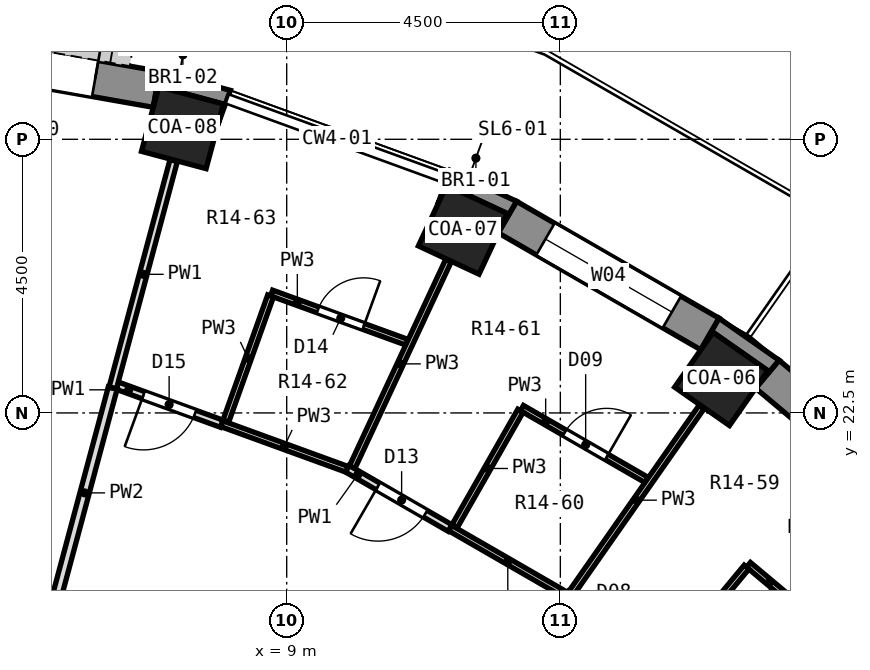
"""IFC4 building model, lengths in metres.
Left out: names, types, materials, properties, quantities, classifications, styles, units other than length and angle.
Written with IfcOpenShell. Run it as: python <this file> out.ifc"""

import sys

from ifc_helpers import new_model, si_unit, direction, frame, frame_2d, origin, origin_2d, place, context, subcontext, project, spatial, polyline, rectangle, outline, extrude, element, fill, save


model = new_model("IFC4")
c1 = context("Model", 3, precision=1e-05, world=origin(), true_north=direction((0.0, 1.0)))
c2 = subcontext(c1, "Body", "Model", "MODEL_VIEW")
j1 = project(units=[si_unit("LENGTHUNIT", "METRE"), si_unit("PLANEANGLEUNIT", "RADIAN")], contexts=[c1])
p1 = place(None, origin())
s1 = spatial("IfcSite", under=j1, at=p1, CompositionType="ELEMENT")
p2 = place(p1, origin())
s2 = spatial("IfcBuilding", under=s1, at=p2, CompositionType="ELEMENT")
p3 = place(p2, frame((0.0, 0.0, 75.8)))
s3 = spatial("IfcBuildingStorey", under=s2, at=p3, CompositionType="ELEMENT", Elevation=75.8)
for number, where, z_axis, x_axis in (
    (1, (16.146, 23.059, 0.0), (0.0, 0.0, 1.0), (0.574, 0.819, 0.0)),
    (2, (11.897, 25.512, 0.0), (0.0, 0.0, 1.0), (0.423, 0.906, 0.0)),
    (3, (7.286, 27.191, 0.0), (0.0, 0.0, 1.0), (0.259, 0.966, 0.0)),
):
    element("IfcColumn", number, at=place(p3, frame(where, z_axis=z_axis, x_axis=x_axis)), inside=s3, PredefinedType="COLUMN", context=c2, shape_type="SweptSolid", body=[
        extrude(rectangle(XDim=1.1, YDim=1.1, at=origin_2d()), origin(), (0.0, 0.0, 1.0), 3.3),
    ])
p4 = place(p3, frame((19.85, 20.665, 0.0), z_axis=(0.0, 0.0, 1.0), x_axis=(-0.766026164483, 0.642809392687, 0.0)))
e4 = element("IfcWall", 4, at=p4, inside=s3, PredefinedType="SOLIDWALL", context=c2, shape_type="SweptSolid", body=[
    extrude(rectangle(XDim=3.846, YDim=0.6, at=frame_2d((1.923, 0.0))), origin(), (0.0, 0.0, 1.0), 2.75),
])
p5 = place(p4, frame((0.723, 0.0, 0.9)))
e5 = element("IfcOpeningElement", 5, at=p5, cuts=e4, PredefinedType="OPENING", context=c2, shape_type="SweptSolid", body=[
    extrude(rectangle(XDim=2.4, YDim=1.8, at=frame_2d((1.2, 0.9))), frame((0.0, 0.312, 0.0), z_axis=(0.0, -1.0, 0.0), x_axis=(1.0, 0.0, 0.0)), (0.0, 0.0, 1.0), 0.624),
])
p6 = place(p3, frame((15.96, 23.798, 0.0), z_axis=(0.0, 0.0, 1.0), x_axis=(-0.86603124159, 0.499989888488, 0.0)))
e6 = element("IfcWall", 6, at=p6, inside=s3, PredefinedType="SOLIDWALL", context=c2, shape_type="SweptSolid", body=[
    extrude(rectangle(XDim=3.846, YDim=0.6, at=frame_2d((1.923, 0.0))), origin(), (0.0, 0.0, 1.0), 2.75),
])
p7 = place(p6, frame((0.723, 0.0, 0.9)))
e7 = element("IfcOpeningElement", 7, at=p7, cuts=e6, PredefinedType="OPENING", context=c2, shape_type="SweptSolid", body=[
    extrude(rectangle(XDim=2.4, YDim=1.8, at=frame_2d((1.2, 0.9))), frame((0.0, 0.312, 0.0), z_axis=(0.0, -1.0, 0.0), x_axis=(1.0, 0.0, 0.0)), (0.0, 0.0, 1.0), 0.624),
])
p8 = place(p3, frame((6.858, 27.821, 0.0), z_axis=(0.0, 0.0, 1.0), x_axis=(-0.984800809218, 0.173687553279, 0.0)))
e8 = element("IfcWall", 8, at=p8, inside=s3, PredefinedType="SOLIDWALL", context=c2, shape_type="SweptSolid", body=[
    extrude(rectangle(XDim=3.846, YDim=0.6, at=frame_2d((1.923, 0.0))), origin(), (0.0, 0.0, 1.0), 2.75),
])
p9 = place(p8, frame((1.023, 0.0, 0.0)))
e9 = element("IfcOpeningElement", 9, at=p9, cuts=e8, PredefinedType="OPENING", context=c2, shape_type="SweptSolid", body=[
    extrude(rectangle(XDim=1.8, YDim=2.4, at=frame_2d((0.9, 1.2))), frame((0.0, 0.312, 0.0), z_axis=(0.0, -1.0, 0.0), x_axis=(1.0, 0.0, 0.0)), (0.0, 0.0, 1.0), 0.624),
])
p10 = place(p3, origin())
e10 = element("IfcWall", 10, at=p10, inside=s3, PredefinedType="SOLIDWALL", context=c2, shape_type="SweptSolid", body=[
    extrude(outline(polyline([(17.097, 23.367), (16.11, 24.058), (15.81, 23.538), (16.011, 23.825), (16.912, 23.194), (16.711, 22.907), (17.097, 23.367)])), origin(), (0.0, 0.0, 1.0), 2.75),
])
p11 = place(p3, origin())
e11 = element("IfcWall", 11, at=p11, inside=s3, PredefinedType="SOLIDWALL", context=c2, shape_type="SweptSolid", body=[
    extrude(outline(polyline([(11.688, 26.49), (11.483, 25.926), (11.631, 26.243), (12.628, 25.779), (12.479, 25.461), (12.78, 25.981), (11.688, 26.49)])), origin(), (0.0, 0.0, 1.0), 2.75),
])
p12 = place(p3, origin())
e12 = element("IfcWall", 12, at=p12, inside=s3, PredefinedType="SOLIDWALL", context=c2, shape_type="SweptSolid", body=[
    extrude(outline(polyline([(6.91, 28.117), (6.806, 27.526), (6.897, 27.865), (7.959, 27.58), (7.869, 27.241), (8.074, 27.805), (6.91, 28.117)])), origin(), (0.0, 0.0, 1.0), 2.75),
])
p13 = place(p3, frame((16.594, 20.003, 0.0), z_axis=(0.0, 0.0, 1.0), x_axis=(0.766216087927, -0.642582995886, 0.0)))
e13 = element("IfcWall", 13, at=p13, inside=s3, PredefinedType="PARTITIONING", context=c2, shape_type="SweptSolid", body=[
    extrude(rectangle(XDim=2.37, YDim=0.1, at=frame_2d((1.185, 0.0))), origin(), (0.0, 0.0, 1.0), 2.75),
])
p14 = place(p13, frame((0.81, 0.0, 0.0)))
e14 = element("IfcOpeningElement", 14, at=p14, cuts=e13, PredefinedType="OPENING", context=c2, shape_type="SweptSolid", body=[
    extrude(rectangle(XDim=0.8, YDim=2.1, at=frame_2d((0.4, 1.05))), frame((0.0, 0.062, 0.0), z_axis=(0.0, -1.0, 0.0), x_axis=(1.0, 0.0, 0.0)), (0.0, 0.0, 1.0), 0.124),
])
p15 = place(p3, frame((11.687, 20.607, 0.0), z_axis=(0.0, 0.0, 1.0), x_axis=(0.866180024749, -0.499732092952, 0.0)))
e15 = element("IfcWall", 15, at=p15, inside=s3, PredefinedType="PARTITIONING", context=c2, shape_type="SweptSolid", body=[
    extrude(rectangle(XDim=2.193, YDim=0.1, at=frame_2d((1.096, 0.0))), origin(), (0.0, 0.0, 1.0), 2.75),
])
p16 = place(p3, frame((9.995, 21.584, 0.0), z_axis=(0.0, 0.0, 1.0), x_axis=(0.865996179119, -0.50005061519, 0.0)))
e16 = element("IfcWall", 16, at=p16, inside=s3, PredefinedType="PARTITIONING", context=c2, shape_type="SweptSolid", body=[
    extrude(rectangle(XDim=1.953, YDim=0.125, at=frame_2d((0.977, 0.0))), origin(), (0.0, 0.0, 1.0), 2.75),
])
p17 = place(p16, frame((0.583, 0.0, 0.0)))
e17 = element("IfcOpeningElement", 17, at=p17, cuts=e16, PredefinedType="OPENING", context=c2, shape_type="SweptSolid", body=[
    extrude(rectangle(XDim=0.9, YDim=2.1, at=frame_2d((0.45, 1.05))), frame((0.0, 0.074, 0.0), z_axis=(0.0, -1.0, 0.0), x_axis=(1.0, 0.0, 0.0)), (0.0, 0.0, 1.0), 0.149),
])
p18 = place(p3, frame((12.869, 22.58, 0.0), z_axis=(0.0, 0.0, 1.0), x_axis=(0.866116947413, -0.499841408252, 0.0)))
e18 = element("IfcWall", 18, at=p18, inside=s3, PredefinedType="PARTITIONING", context=c2, shape_type="SweptSolid", body=[
    extrude(rectangle(XDim=2.369, YDim=0.1, at=frame_2d((1.185, 0.0))), origin(), (0.0, 0.0, 1.0), 2.75),
])
p19 = place(p18, frame((0.809, 0.0, 0.0)))
e19 = element("IfcOpeningElement", 19, at=p19, cuts=e18, PredefinedType="OPENING", context=c2, shape_type="SweptSolid", body=[
    extrude(rectangle(XDim=0.8, YDim=2.1, at=frame_2d((0.4, 1.05))), frame((0.0, 0.062, 0.0), z_axis=(0.0, -1.0, 0.0), x_axis=(1.0, 0.0, 0.0)), (0.0, 0.0, 1.0), 0.124),
])
p20 = place(p3, frame((7.931, 22.323, 0.0), z_axis=(0.0, 0.0, 1.0), x_axis=(0.939747896663, -0.3418682359, 0.0)))
e20 = element("IfcWall", 20, at=p20, inside=s3, PredefinedType="PARTITIONING", context=c2, shape_type="SweptSolid", body=[
    extrude(rectangle(XDim=2.192, YDim=0.1, at=frame_2d((1.096, 0.0))), origin(), (0.0, 0.0, 1.0), 2.75),
])
p21 = place(p3, frame((6.214, 22.949, 0.0), z_axis=(0.0, 0.0, 1.0), x_axis=(0.939570923622, -0.34235431863, 0.0)))
e21 = element("IfcWall", 21, at=p21, inside=s3, PredefinedType="PARTITIONING", context=c2, shape_type="SweptSolid", body=[
    extrude(rectangle(XDim=1.828, YDim=0.125, at=frame_2d((0.914, 0.0))), origin(), (0.0, 0.0, 1.0), 2.75),
])
p22 = place(p21, frame((0.458, 0.0, 0.0)))
e22 = element("IfcOpeningElement", 22, at=p22, cuts=e21, PredefinedType="OPENING", context=c2, shape_type="SweptSolid", body=[
    extrude(rectangle(XDim=0.9, YDim=2.1, at=frame_2d((0.45, 1.05))), frame((0.0, 0.074, 0.0), z_axis=(0.0, -1.0, 0.0), x_axis=(1.0, 0.0, 0.0)), (0.0, 0.0, 1.0), 0.149),
])
p23 = place(p3, frame((8.752, 24.472, 0.0), z_axis=(0.0, 0.0, 1.0), x_axis=(0.939784398176, -0.341767881674, 0.0)))
e23 = element("IfcWall", 23, at=p23, inside=s3, PredefinedType="PARTITIONING", context=c2, shape_type="SweptSolid", body=[
    extrude(rectangle(XDim=2.369, YDim=0.1, at=frame_2d((1.185, 0.0))), origin(), (0.0, 0.0, 1.0), 2.75),
])
p24 = place(p23, frame((0.81, 0.0, 0.0)))
e24 = element("IfcOpeningElement", 24, at=p24, cuts=e23, PredefinedType="OPENING", context=c2, shape_type="SweptSolid", body=[
    extrude(rectangle(XDim=0.8, YDim=2.1, at=frame_2d((0.4, 1.05))), frame((0.0, 0.062, 0.0), z_axis=(0.0, -1.0, 0.0), x_axis=(1.0, 0.0, 0.0)), (0.0, 0.0, 1.0), 0.124),
])
p25 = place(p3, frame((15.166, 18.281, 0.0), z_axis=(0.0, 0.0, 1.0), x_axis=(0.638293924204, 0.769792742447, 0.0)))
e25 = element("IfcWall", 25, at=p25, inside=s3, PredefinedType="PARTITIONING", context=c2, shape_type="SweptSolid", body=[
    extrude(rectangle(XDim=2.187, YDim=0.1, at=frame_2d((1.094, 0.0))), origin(), (0.0, 0.0, 1.0), 2.75),
])
p26 = place(p3, frame((13.676, 19.531, 0.0), z_axis=(0.0, 0.0, 1.0), x_axis=(0.573576035414, 0.819152325028, 0.0)))
e26 = element("IfcWall", 26, at=p26, inside=s3, PredefinedType="PARTITIONING", context=c2, shape_type="SweptSolid", body=[
    extrude(rectangle(XDim=3.747, YDim=0.1, at=frame_2d((1.874, 0.0))), origin(), (0.0, 0.0, 1.0), 2.75),
])
p27 = place(p3, frame((11.761, 20.636, 0.0), z_axis=(0.0, 0.0, 1.0), x_axis=(0.495213152806, 0.868771508101, 0.0)))
e27 = element("IfcWall", 27, at=p27, inside=s3, PredefinedType="PARTITIONING", context=c2, shape_type="SweptSolid", body=[
    extrude(rectangle(XDim=2.188, YDim=0.1, at=frame_2d((1.094, 0.0))), origin(), (0.0, 0.0, 1.0), 2.75),
])
p28 = place(p3, frame((10.077, 21.608, 0.0), z_axis=(0.0, 0.0, 1.0), x_axis=(0.422311144858, 0.906450934651, 0.0)))
e28 = element("IfcWall", 28, at=p28, inside=s3, PredefinedType="PARTITIONING", context=c2, shape_type="SweptSolid", body=[
    extrude(rectangle(XDim=3.747, YDim=0.1, at=frame_2d((1.874, 0.0))), origin(), (0.0, 0.0, 1.0), 2.75),
])
p29 = place(p3, frame((7.999, 22.365, 0.0), z_axis=(0.0, 0.0, 1.0), x_axis=(0.336477788464, 0.941691402674, 0.0)))
e29 = element("IfcWall", 29, at=p29, inside=s3, PredefinedType="PARTITIONING", context=c2, shape_type="SweptSolid", body=[
    extrude(rectangle(XDim=2.188, YDim=0.1, at=frame_2d((1.094, 0.0))), origin(), (0.0, 0.0, 1.0), 2.75),
])
p30 = place(p3, frame((6.139, 22.91, 0.0), z_axis=(0.0, 0.0, 1.0), x_axis=(0.258761298032, 0.96594129772, 0.0)))
e30 = element("IfcWall", 30, at=p30, inside=s3, PredefinedType="PARTITIONING", context=c2, shape_type="SweptSolid", body=[
    extrude(rectangle(XDim=3.872, YDim=0.125, at=frame_2d((1.936, 0.0))), origin(), (0.0, 0.0, 1.0), 2.75),
])
p31 = place(p3, frame((5.214, 19.46, 0.0), z_axis=(0.0, 0.0, 1.0), x_axis=(0.25897301144, 0.965884557981, 0.0)))
e31 = element("IfcWall", 31, at=p31, inside=s3, PredefinedType="PARTITIONING", context=c2, shape_type="SweptSolid", body=[
    extrude(rectangle(XDim=3.571, YDim=0.15, at=frame_2d((1.786, 0.0))), origin(), (0.0, 0.0, 1.0), 2.75),
])
p32 = place(p7, origin())
e32 = element("IfcWindow", 32, at=p32, inside=s3, PartitioningType="SINGLE_PANEL", PredefinedType="WINDOW", context=c2, shape_type="SweptSolid", body=[
    extrude(rectangle(XDim=2.4, YDim=1.8, at=frame_2d((1.2, 0.9))), frame((0.0, 0.18, 0.0), z_axis=(0.0, -1.0, 0.0), x_axis=(1.0, 0.0, 0.0)), (0.0, 0.0, 1.0), 0.06),
])
fill(e7, e32)
p33 = place(p9, frame((1.8, 0.0, 0.0), z_axis=(0.0, 0.0, 1.0), x_axis=(-1.0, 0.0, 0.0)))
e33 = element("IfcDoor", 33, at=p33, inside=s3, OperationType="DOUBLE_DOOR_SINGLE_SWING", PredefinedType="DOOR", context=c2, shape_type="SweptSolid", body=[
    extrude(rectangle(XDim=1.8, YDim=2.4, at=frame_2d((0.9, 1.2))), frame((0.0, -0.075, 0.0), z_axis=(0.0, -1.0, 0.0), x_axis=(1.0, 0.0, 0.0)), (0.0, 0.0, 1.0), 0.05),
])
fill(e9, e33)
p34 = place(p19, origin())
e34 = element("IfcDoor", 34, at=p34, inside=s3, OperationType="SINGLE_SWING_RIGHT", PredefinedType="DOOR", context=c2, shape_type="SweptSolid", body=[
    extrude(rectangle(XDim=0.8, YDim=2.1, at=frame_2d((0.4, 1.05))), frame((0.0, 0.025, 0.0), z_axis=(0.0, -1.0, 0.0), x_axis=(1.0, 0.0, 0.0)), (0.0, 0.0, 1.0), 0.05),
])
fill(e19, e34)
p35 = place(p17, frame((0.9, 0.0, 0.0), z_axis=(0.0, 0.0, 1.0), x_axis=(-1.0, 0.0, 0.0)))
e35 = element("IfcDoor", 35, at=p35, inside=s3, OperationType="SINGLE_SWING_RIGHT", PredefinedType="DOOR", context=c2, shape_type="SweptSolid", body=[
    extrude(rectangle(XDim=0.9, YDim=2.1, at=frame_2d((0.45, 1.05))), frame((0.0, 0.025, 0.0), z_axis=(0.0, -1.0, 0.0), x_axis=(1.0, 0.0, 0.0)), (0.0, 0.0, 1.0), 0.05),
])
fill(e17, e35)
p36 = place(p24, origin())
e36 = element("IfcDoor", 36, at=p36, inside=s3, OperationType="SINGLE_SWING_RIGHT", PredefinedType="DOOR", context=c2, shape_type="SweptSolid", body=[
    extrude(rectangle(XDim=0.8, YDim=2.1, at=frame_2d((0.4, 1.05))), frame((0.0, 0.025, 0.0), z_axis=(0.0, -1.0, 0.0), x_axis=(1.0, 0.0, 0.0)), (0.0, 0.0, 1.0), 0.05),
])
fill(e24, e36)
p37 = place(p22, frame((0.9, 0.0, 0.0), z_axis=(0.0, 0.0, 1.0), x_axis=(-1.0, 0.0, 0.0)))
e37 = element("IfcDoor", 37, at=p37, inside=s3, OperationType="SINGLE_SWING_RIGHT", PredefinedType="DOOR", context=c2, shape_type="SweptSolid", body=[
    extrude(rectangle(XDim=0.9, YDim=2.1, at=frame_2d((0.45, 1.05))), frame((0.0, 0.025, 0.0), z_axis=(0.0, -1.0, 0.0), x_axis=(1.0, 0.0, 0.0)), (0.0, 0.0, 1.0), 0.05),
])
fill(e22, e37)
save(model, sys.argv[1])
